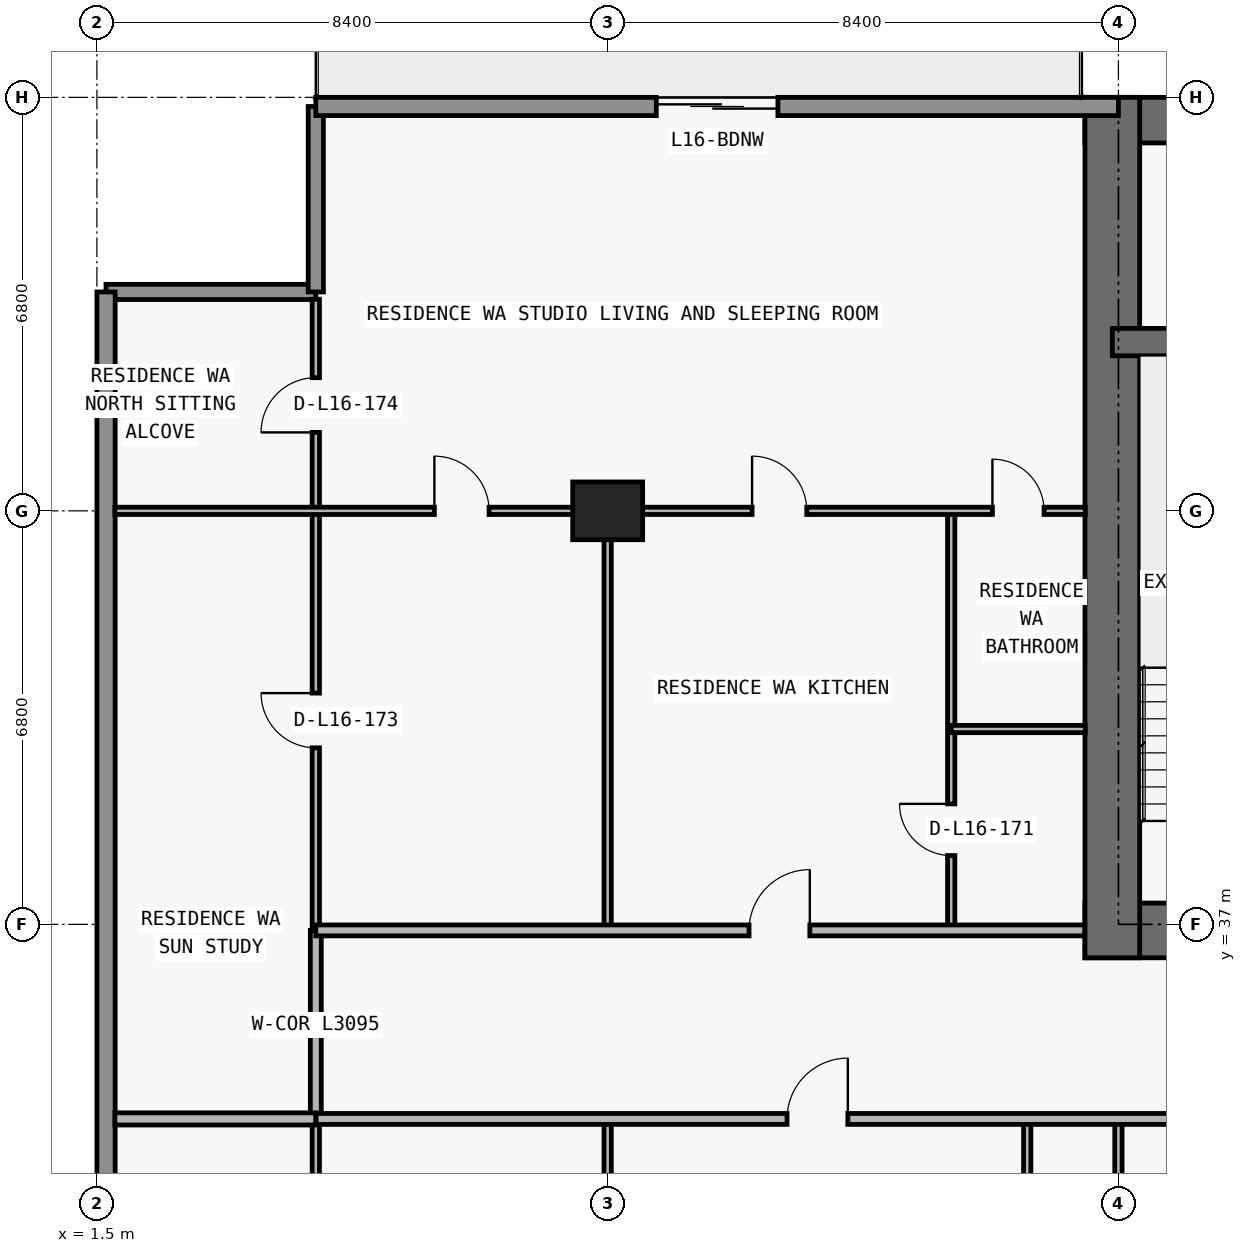
"""IFC4 building model, lengths in metres.
Left out: names, types, materials, properties, quantities, classifications, styles, units other than length and angle.
Written with IfcOpenShell. Run it as: python <this file> out.ifc"""

import sys

from ifc_helpers import new_model, si_unit, direction, frame, frame_2d, origin, origin_2d, place, context, subcontext, project, spatial, rectangle, extrude, element, fill, save


model = new_model("IFC4")
c1 = context("Model", 3, precision=1e-05, world=origin(), true_north=direction((0.0, 1.0)))
c2 = subcontext(c1, "Body", "Model", "MODEL_VIEW")
j1 = project(units=[si_unit("LENGTHUNIT", "METRE"), si_unit("PLANEANGLEUNIT", "RADIAN")], contexts=[c1])
p1 = place(None, origin())
s1 = spatial("IfcSite", under=j1, at=p1, CompositionType="ELEMENT")
p2 = place(p1, origin())
s2 = spatial("IfcBuilding", under=s1, at=p2, CompositionType="ELEMENT")
p3 = place(p2, frame((0.0, 0.0, 63.0)))
s3 = spatial("IfcBuildingStorey", under=s2, at=p3, CompositionType="ELEMENT", Elevation=63.0)
p4 = place(p3, frame((9.9, 43.8, 0.0), z_axis=(0.0, 0.0, 1.0), x_axis=(1.0, 0.0, 0.0)))
e1 = element("IfcColumn", 1, at=p4, inside=s3, PredefinedType="COLUMN", context=c2, shape_type="SweptSolid", body=[
    extrude(rectangle(XDim=1.15, YDim=0.95, at=origin_2d()), origin(), (0.0, 0.0, 1.0), 3.05),
])
p5 = place(p3, frame((17.75, 36.9, 0.0), z_axis=(0.0, 0.0, 1.0), x_axis=(1.0, 0.0, 0.0)))
e2 = element("IfcWall", 2, at=p5, inside=s3, PredefinedType="SHEAR", context=c2, shape_type="SweptSolid", body=[
    extrude(rectangle(XDim=42.3, YDim=0.9, at=frame_2d((21.15, 0.0))), origin(), (0.0, 0.0, 1.0), 3.05),
])
p6 = place(p5, frame((14.55, 0.0, 0.0)))
e3 = element("IfcOpeningElement", 3, at=p6, cuts=e2, PredefinedType="OPENING", context=c2, shape_type="SweptSolid", body=[
    extrude(rectangle(XDim=1.1, YDim=2.15, at=frame_2d((0.55, 1.075))), frame((0.0, 0.46, 0.0), z_axis=(0.0, -1.0, 0.0), x_axis=(1.0, 0.0, 0.0)), (0.0, 0.0, 1.0), 0.92),
])
p7 = place(p5, frame((6.4, 0.0, 0.0)))
e4 = element("IfcOpeningElement", 4, at=p7, cuts=e2, PredefinedType="OPENING", context=c2, shape_type="SweptSolid", body=[
    extrude(rectangle(XDim=1.05, YDim=2.15, at=frame_2d((0.525, 1.075))), frame((0.0, 0.46, 0.0), z_axis=(0.0, -1.0, 0.0), x_axis=(1.0, 0.0, 0.0)), (0.0, 0.0, 1.0), 0.92),
])
p8 = place(p5, frame((34.9, 0.0, 0.0)))
e5 = element("IfcOpeningElement", 5, at=p8, cuts=e2, PredefinedType="OPENING", context=c2, shape_type="SweptSolid", body=[
    extrude(rectangle(XDim=1.05, YDim=2.15, at=frame_2d((0.525, 1.075))), frame((0.0, 0.46, 0.0), z_axis=(0.0, -1.0, 0.0), x_axis=(1.0, 0.0, 0.0)), (0.0, 0.0, 1.0), 0.92),
])
p9 = place(p5, frame((11.012, 0.0, 0.0)))
e6 = element("IfcOpeningElement", 6, at=p9, cuts=e2, PredefinedType="OPENING", context=c2, shape_type="SweptSolid", body=[
    extrude(rectangle(XDim=1.05, YDim=2.15, at=frame_2d((0.525, 1.075))), frame((0.0, 0.46, 0.0), z_axis=(0.0, -1.0, 0.0), x_axis=(1.0, 0.0, 0.0)), (0.0, 0.0, 1.0), 0.92),
])
p10 = place(p5, frame((24.25, 0.0, 0.0)))
e7 = element("IfcOpeningElement", 7, at=p10, cuts=e2, PredefinedType="OPENING", context=c2, shape_type="SweptSolid", body=[
    extrude(rectangle(XDim=1.05, YDim=2.15, at=frame_2d((0.525, 1.075))), frame((0.0, 0.46, 0.0), z_axis=(0.0, -1.0, 0.0), x_axis=(1.0, 0.0, 0.0)), (0.0, 0.0, 1.0), 0.92),
])
p11 = place(p3, frame((17.75, 50.225, 0.0), z_axis=(0.0, 0.0, 1.0), x_axis=(1.0, 0.0, 0.0)))
e8 = element("IfcWall", 8, at=p11, inside=s3, PredefinedType="SHEAR", context=c2, shape_type="SweptSolid", body=[
    extrude(rectangle(XDim=42.3, YDim=0.75, at=frame_2d((21.15, 0.0))), origin(), (0.0, 0.0, 1.0), 3.05),
])
p12 = place(p3, frame((18.2, 36.45, 0.0), z_axis=(0.0, 0.0, 1.0), x_axis=(0.0, 1.0, 0.0)))
e9 = element("IfcWall", 9, at=p12, inside=s3, PredefinedType="SHEAR", context=c2, shape_type="SweptSolid", body=[
    extrude(rectangle(XDim=14.15, YDim=0.9, at=frame_2d((7.075, 0.0))), origin(), (0.0, 0.0, 1.0), 3.05),
])
p13 = place(p3, frame((18.2, 46.575, 0.0), z_axis=(0.0, 0.0, 1.0), x_axis=(1.0, 0.0, 0.0)))
e10 = element("IfcWall", 10, at=p13, inside=s3, PredefinedType="SHEAR", context=c2, shape_type="SweptSolid", body=[
    extrude(rectangle(XDim=41.4, YDim=0.45, at=frame_2d((20.7, 0.0))), origin(), (0.0, 0.0, 1.0), 3.05),
])
p14 = place(p13, frame((7.675, 0.0, 0.0)))
e11 = element("IfcOpeningElement", 11, at=p14, cuts=e10, PredefinedType="OPENING", context=c2, shape_type="SweptSolid", body=[
    extrude(rectangle(XDim=1.05, YDim=2.15, at=frame_2d((0.525, 1.075))), frame((0.0, 0.235, 0.0), z_axis=(0.0, -1.0, 0.0), x_axis=(1.0, 0.0, 0.0)), (0.0, 0.0, 1.0), 0.47),
])
p15 = place(p13, frame((32.725, 0.0, 0.0)))
e12 = element("IfcOpeningElement", 12, at=p15, cuts=e10, PredefinedType="OPENING", context=c2, shape_type="SweptSolid", body=[
    extrude(rectangle(XDim=1.05, YDim=2.15, at=frame_2d((0.525, 1.075))), frame((0.0, 0.235, 0.0), z_axis=(0.0, -1.0, 0.0), x_axis=(1.0, 0.0, 0.0)), (0.0, 0.0, 1.0), 0.47),
])
p16 = place(p3, frame((1.65, 47.4, 0.0), z_axis=(0.0, 0.0, 1.0), x_axis=(1.0, 0.0, 0.0)))
e13 = element("IfcWall", 13, at=p16, inside=s3, PredefinedType="ELEMENTEDWALL", context=c2, shape_type="SweptSolid", body=[
    extrude(rectangle(XDim=3.45, YDim=0.25, at=frame_2d((1.725, 0.0))), origin(), (0.0, 0.0, 1.0), 3.05),
])
p17 = place(p3, frame((5.1, 47.4, 0.0), z_axis=(0.0, 0.0, 1.0), x_axis=(0.0, 1.0, 0.0)))
e14 = element("IfcWall", 14, at=p17, inside=s3, PredefinedType="ELEMENTEDWALL", context=c2, shape_type="SweptSolid", body=[
    extrude(rectangle(XDim=3.05, YDim=0.25, at=frame_2d((1.525, 0.0))), origin(), (0.0, 0.0, 1.0), 3.05),
])
p18 = place(p3, frame((1.65, 26.8, 0.0), z_axis=(0.0, 0.0, 1.0), x_axis=(0.0, 1.0, 0.0)))
e15 = element("IfcWall", 15, at=p18, inside=s3, PredefinedType="STANDARD", context=c2, shape_type="SweptSolid", body=[
    extrude(rectangle(XDim=20.6, YDim=0.3, at=frame_2d((10.3, 0.0))), origin(), (0.0, 0.0, 1.0), 3.05),
])
p19 = place(p3, frame((5.1, 50.45, 0.0), z_axis=(0.0, 0.0, 1.0), x_axis=(1.0, 0.0, 0.0)))
e16 = element("IfcWall", 16, at=p19, inside=s3, PredefinedType="STANDARD", context=c2, shape_type="SweptSolid", body=[
    extrude(rectangle(XDim=13.2, YDim=0.3, at=frame_2d((6.6, 0.0))), origin(), (0.0, 0.0, 1.0), 3.05),
])
p20 = place(p19, frame((5.6, 0.0, 0.0)))
e17 = element("IfcOpeningElement", 17, at=p20, cuts=e16, PredefinedType="OPENING", context=c2, shape_type="SweptSolid", body=[
    extrude(rectangle(XDim=2.0, YDim=2.3, at=frame_2d((1.0, 1.15))), frame((0.0, 0.16, 0.0), z_axis=(0.0, -1.0, 0.0), x_axis=(1.0, 0.0, 0.0)), (0.0, 0.0, 1.0), 0.32),
])
p21 = place(p3, frame((5.1, 26.98, 0.0), z_axis=(0.0, 0.0, 1.0), x_axis=(0.0, 1.0, 0.0)))
e18 = element("IfcWall", 18, at=p21, inside=s3, PredefinedType="PARTITIONING", context=c2, shape_type="SweptSolid", body=[
    extrude(rectangle(XDim=6.82, YDim=0.12, at=frame_2d((3.41, 0.0))), origin(), (0.0, 0.0, 1.0), 3.05),
])
p22 = place(p3, frame((5.1, 33.805, 0.0), z_axis=(0.0, 0.0, 1.0), x_axis=(0.0, 1.0, 0.0)))
e19 = element("IfcWall", 19, at=p22, inside=s3, PredefinedType="PARTITIONING", context=c2, shape_type="SweptSolid", body=[
    extrude(rectangle(XDim=3.095, YDim=0.18, at=frame_2d((1.547, 0.0))), origin(), (0.0, 0.0, 1.0), 3.05),
])
p23 = place(p3, frame((5.1, 36.905, 0.0), z_axis=(0.0, 0.0, 1.0), x_axis=(0.0, 1.0, 0.0)))
e20 = element("IfcWall", 20, at=p23, inside=s3, PredefinedType="PARTITIONING", context=c2, shape_type="SweptSolid", body=[
    extrude(rectangle(XDim=10.375, YDim=0.12, at=frame_2d((5.188, 0.0))), origin(), (0.0, 0.0, 1.0), 3.05),
])
p24 = place(p23, frame((2.998, 0.0, 0.0)))
e21 = element("IfcOpeningElement", 21, at=p24, cuts=e20, PredefinedType="OPENING", context=c2, shape_type="SweptSolid", body=[
    extrude(rectangle(XDim=0.9, YDim=2.15, at=frame_2d((0.45, 1.075))), frame((0.0, 0.07, 0.0), z_axis=(0.0, -1.0, 0.0), x_axis=(1.0, 0.0, 0.0)), (0.0, 0.0, 1.0), 0.14),
])
p25 = place(p23, frame((8.185, 0.0, 0.0)))
e22 = element("IfcOpeningElement", 22, at=p25, cuts=e20, PredefinedType="OPENING", context=c2, shape_type="SweptSolid", body=[
    extrude(rectangle(XDim=0.9, YDim=2.15, at=frame_2d((0.45, 1.075))), frame((0.0, 0.07, 0.0), z_axis=(0.0, -1.0, 0.0), x_axis=(1.0, 0.0, 0.0)), (0.0, 0.0, 1.0), 0.14),
])
p26 = place(p3, frame((9.9, 26.98, 0.0), z_axis=(0.0, 0.0, 1.0), x_axis=(0.0, 1.0, 0.0)))
e23 = element("IfcWall", 23, at=p26, inside=s3, PredefinedType="PARTITIONING", context=c2, shape_type="SweptSolid", body=[
    extrude(rectangle(XDim=6.82, YDim=0.12, at=frame_2d((3.41, 0.0))), origin(), (0.0, 0.0, 1.0), 2.11),
])
p27 = place(p3, frame((9.9, 36.9, 0.0), z_axis=(0.0, 0.0, 1.0), x_axis=(0.0, 1.0, 0.0)))
e24 = element("IfcWall", 24, at=p27, inside=s3, PredefinedType="PARTITIONING", context=c2, shape_type="SweptSolid", body=[
    extrude(rectangle(XDim=6.9, YDim=0.12, at=frame_2d((3.45, 0.0))), origin(), (0.0, 0.0, 1.0), 2.11),
])
p28 = place(p3, frame((15.55, 36.9, 0.0), z_axis=(0.0, 0.0, 1.0), x_axis=(0.0, 1.0, 0.0)))
e25 = element("IfcWall", 25, at=p28, inside=s3, PredefinedType="PARTITIONING", context=c2, shape_type="SweptSolid", body=[
    extrude(rectangle(XDim=6.9, YDim=0.12, at=frame_2d((3.45, 0.0))), origin(), (0.0, 0.0, 1.0), 2.499),
])
p29 = place(p28, frame((1.231, 0.0, 0.0)))
e26 = element("IfcOpeningElement", 26, at=p29, cuts=e25, PredefinedType="OPENING", context=c2, shape_type="SweptSolid", body=[
    extrude(rectangle(XDim=0.85, YDim=2.1, at=frame_2d((0.425, 1.05))), frame((0.0, 0.07, 0.0), z_axis=(0.0, -1.0, 0.0), x_axis=(1.0, 0.0, 0.0)), (0.0, 0.0, 1.0), 0.14),
])
p30 = place(p3, frame((16.8, 26.98, 0.0), z_axis=(0.0, 0.0, 1.0), x_axis=(0.0, 1.0, 0.0)))
e27 = element("IfcWall", 27, at=p30, inside=s3, PredefinedType="PARTITIONING", context=c2, shape_type="SweptSolid", body=[
    extrude(rectangle(XDim=6.82, YDim=0.12, at=frame_2d((3.41, 0.0))), origin(), (0.0, 0.0, 1.0), 3.05),
])
p31 = place(p30, frame((3.435, 0.0, 0.0)))
e28 = element("IfcOpeningElement", 28, at=p31, cuts=e27, PredefinedType="OPENING", context=c2, shape_type="SweptSolid", body=[
    extrude(rectangle(XDim=0.85, YDim=2.1, at=frame_2d((0.425, 1.05))), frame((0.0, 0.07, 0.0), z_axis=(0.0, -1.0, 0.0), x_axis=(1.0, 0.0, 0.0)), (0.0, 0.0, 1.0), 0.14),
])
p32 = place(p3, frame((18.3, 26.98, 0.0), z_axis=(0.0, 0.0, 1.0), x_axis=(0.0, 1.0, 0.0)))
e29 = element("IfcWall", 29, at=p32, inside=s3, PredefinedType="PARTITIONING", context=c2, shape_type="SweptSolid", body=[
    extrude(rectangle(XDim=6.82, YDim=0.12, at=frame_2d((3.41, 0.0))), origin(), (0.0, 0.0, 1.0), 2.11),
])
p33 = place(p3, frame((1.795, 33.8, 0.0), z_axis=(0.0, 0.0, 1.0), x_axis=(1.0, 0.0, 0.0)))
e30 = element("IfcWall", 30, at=p33, inside=s3, PredefinedType="PARTITIONING", context=c2, shape_type="SweptSolid", body=[
    extrude(rectangle(XDim=3.305, YDim=0.2, at=frame_2d((1.653, 0.0))), origin(), (0.0, 0.0, 1.0), 3.05),
])
p34 = place(p3, frame((5.105, 33.8, 0.0), z_axis=(0.0, 0.0, 1.0), x_axis=(1.0, 0.0, 0.0)))
e31 = element("IfcWall", 31, at=p34, inside=s3, PredefinedType="PARTITIONING", context=c2, shape_type="SweptSolid", body=[
    extrude(rectangle(XDim=21.545, YDim=0.18, at=frame_2d((10.772, 0.0))), origin(), (0.0, 0.0, 1.0), 3.05),
])
p35 = place(p34, frame((7.745, 0.0, 0.0)))
e32 = element("IfcOpeningElement", 32, at=p35, cuts=e31, PredefinedType="OPENING", context=c2, shape_type="SweptSolid", body=[
    extrude(rectangle(XDim=1.0, YDim=2.2, at=frame_2d((0.5, 1.1))), frame((0.0, 0.1, 0.0), z_axis=(0.0, -1.0, 0.0), x_axis=(1.0, 0.0, 0.0)), (0.0, 0.0, 1.0), 0.2),
])
p36 = place(p3, frame((5.1, 36.9, 0.0), z_axis=(0.0, 0.0, 1.0), x_axis=(1.0, 0.0, 0.0)))
e33 = element("IfcWall", 33, at=p36, inside=s3, PredefinedType="PARTITIONING", context=c2, shape_type="SweptSolid", body=[
    extrude(rectangle(XDim=12.645, YDim=0.18, at=frame_2d((6.323, 0.0))), origin(), (0.0, 0.0, 1.0), 3.05),
])
p37 = place(p36, frame((7.125, 0.0, 0.0)))
e34 = element("IfcOpeningElement", 34, at=p37, cuts=e33, PredefinedType="OPENING", context=c2, shape_type="SweptSolid", body=[
    extrude(rectangle(XDim=1.0, YDim=2.2, at=frame_2d((0.5, 1.1))), frame((0.0, 0.1, 0.0), z_axis=(0.0, -1.0, 0.0), x_axis=(1.0, 0.0, 0.0)), (0.0, 0.0, 1.0), 0.2),
])
p38 = place(p3, frame((15.55, 40.212, 0.0), z_axis=(0.0, 0.0, 1.0), x_axis=(1.0, 0.0, 0.0)))
e35 = element("IfcWall", 35, at=p38, inside=s3, PredefinedType="PARTITIONING", context=c2, shape_type="SweptSolid", body=[
    extrude(rectangle(XDim=2.205, YDim=0.12, at=frame_2d((1.103, 0.0))), origin(), (0.0, 0.0, 1.0), 3.05),
])
p39 = place(p3, frame((1.795, 43.8, 0.0), z_axis=(0.0, 0.0, 1.0), x_axis=(1.0, 0.0, 0.0)))
e36 = element("IfcWall", 36, at=p39, inside=s3, PredefinedType="PARTITIONING", context=c2, shape_type="SweptSolid", body=[
    extrude(rectangle(XDim=15.96, YDim=0.12, at=frame_2d((7.98, 0.0))), origin(), (0.0, 0.0, 1.0), 2.339),
])
p40 = place(p39, frame((5.255, 0.0, 0.0)))
e37 = element("IfcOpeningElement", 37, at=p40, cuts=e36, PredefinedType="OPENING", context=c2, shape_type="SweptSolid", body=[
    extrude(rectangle(XDim=0.9, YDim=2.15, at=frame_2d((0.45, 1.075))), frame((0.0, 0.07, 0.0), z_axis=(0.0, -1.0, 0.0), x_axis=(1.0, 0.0, 0.0)), (0.0, 0.0, 1.0), 0.14),
])
p41 = place(p39, frame((10.48, 0.0, 0.0)))
e38 = element("IfcOpeningElement", 38, at=p41, cuts=e36, PredefinedType="OPENING", context=c2, shape_type="SweptSolid", body=[
    extrude(rectangle(XDim=0.9, YDim=2.15, at=frame_2d((0.45, 1.075))), frame((0.0, 0.07, 0.0), z_axis=(0.0, -1.0, 0.0), x_axis=(1.0, 0.0, 0.0)), (0.0, 0.0, 1.0), 0.14),
])
p42 = place(p39, frame((14.433, 0.0, 0.0)))
e39 = element("IfcOpeningElement", 39, at=p42, cuts=e36, PredefinedType="OPENING", context=c2, shape_type="SweptSolid", body=[
    extrude(rectangle(XDim=0.85, YDim=2.1, at=frame_2d((0.425, 1.05))), frame((0.0, 0.07, 0.0), z_axis=(0.0, -1.0, 0.0), x_axis=(1.0, 0.0, 0.0)), (0.0, 0.0, 1.0), 0.14),
])
p43 = place(p20, origin())
e40 = element("IfcDoor", 40, at=p43, inside=s3, OperationType="DOUBLE_DOOR_SLIDING", PredefinedType="DOOR", context=c2, shape_type="SweptSolid", body=[
    extrude(rectangle(XDim=2.0, YDim=2.3, at=frame_2d((1.0, 1.15))), frame((0.0, 0.025, 0.0), z_axis=(0.0, -1.0, 0.0), x_axis=(1.0, 0.0, 0.0)), (0.0, 0.0, 1.0), 0.05),
])
fill(e17, e40)
p44 = place(p35, origin())
e41 = element("IfcDoor", 41, at=p44, inside=s3, OperationType="SINGLE_SWING_RIGHT", PredefinedType="DOOR", context=c2, shape_type="SweptSolid", body=[
    extrude(rectangle(XDim=1.0, YDim=2.2, at=frame_2d((0.5, 1.1))), frame((0.0, 0.025, 0.0), z_axis=(0.0, -1.0, 0.0), x_axis=(1.0, 0.0, 0.0)), (0.0, 0.0, 1.0), 0.05),
])
fill(e32, e41)
p45 = place(p40, origin())
e42 = element("IfcDoor", 42, at=p45, inside=s3, OperationType="SINGLE_SWING_LEFT", PredefinedType="DOOR", context=c2, shape_type="SweptSolid", body=[
    extrude(rectangle(XDim=0.9, YDim=2.15, at=frame_2d((0.45, 1.075))), frame((0.0, 0.025, 0.0), z_axis=(0.0, -1.0, 0.0), x_axis=(1.0, 0.0, 0.0)), (0.0, 0.0, 1.0), 0.05),
])
fill(e37, e42)
p46 = place(p37, origin())
e43 = element("IfcDoor", 43, at=p46, inside=s3, OperationType="SINGLE_SWING_RIGHT", PredefinedType="DOOR", context=c2, shape_type="SweptSolid", body=[
    extrude(rectangle(XDim=1.0, YDim=2.2, at=frame_2d((0.5, 1.1))), frame((0.0, 0.025, 0.0), z_axis=(0.0, -1.0, 0.0), x_axis=(1.0, 0.0, 0.0)), (0.0, 0.0, 1.0), 0.05),
])
fill(e34, e43)
p47 = place(p41, origin())
e44 = element("IfcDoor", 44, at=p47, inside=s3, OperationType="SINGLE_SWING_LEFT", PredefinedType="DOOR", context=c2, shape_type="SweptSolid", body=[
    extrude(rectangle(XDim=0.9, YDim=2.15, at=frame_2d((0.45, 1.075))), frame((0.0, 0.025, 0.0), z_axis=(0.0, -1.0, 0.0), x_axis=(1.0, 0.0, 0.0)), (0.0, 0.0, 1.0), 0.05),
])
fill(e38, e44)
p48 = place(p29, origin())
e45 = element("IfcDoor", 45, at=p48, inside=s3, OperationType="SINGLE_SWING_RIGHT", PredefinedType="DOOR", context=c2, shape_type="SweptSolid", body=[
    extrude(rectangle(XDim=0.85, YDim=2.1, at=frame_2d((0.425, 1.05))), frame((0.0, 0.025, 0.0), z_axis=(0.0, -1.0, 0.0), x_axis=(1.0, 0.0, 0.0)), (0.0, 0.0, 1.0), 0.05),
])
fill(e26, e45)
p49 = place(p42, origin())
e46 = element("IfcDoor", 46, at=p49, inside=s3, OperationType="SINGLE_SWING_LEFT", PredefinedType="DOOR", context=c2, shape_type="SweptSolid", body=[
    extrude(rectangle(XDim=0.85, YDim=2.1, at=frame_2d((0.425, 1.05))), frame((0.0, 0.025, 0.0), z_axis=(0.0, -1.0, 0.0), x_axis=(1.0, 0.0, 0.0)), (0.0, 0.0, 1.0), 0.05),
])
fill(e39, e46)
p50 = place(p24, origin())
e47 = element("IfcDoor", 47, at=p50, inside=s3, OperationType="SINGLE_SWING_RIGHT", PredefinedType="DOOR", context=c2, shape_type="SweptSolid", body=[
    extrude(rectangle(XDim=0.9, YDim=2.15, at=frame_2d((0.45, 1.075))), frame((0.0, 0.025, 0.0), z_axis=(0.0, -1.0, 0.0), x_axis=(1.0, 0.0, 0.0)), (0.0, 0.0, 1.0), 0.05),
])
fill(e21, e47)
p51 = place(p25, origin())
e48 = element("IfcDoor", 48, at=p51, inside=s3, OperationType="SINGLE_SWING_LEFT", PredefinedType="DOOR", context=c2, shape_type="SweptSolid", body=[
    extrude(rectangle(XDim=0.9, YDim=2.15, at=frame_2d((0.45, 1.075))), frame((0.0, 0.025, 0.0), z_axis=(0.0, -1.0, 0.0), x_axis=(1.0, 0.0, 0.0)), (0.0, 0.0, 1.0), 0.05),
])
fill(e22, e48)
save(model, sys.argv[1])
